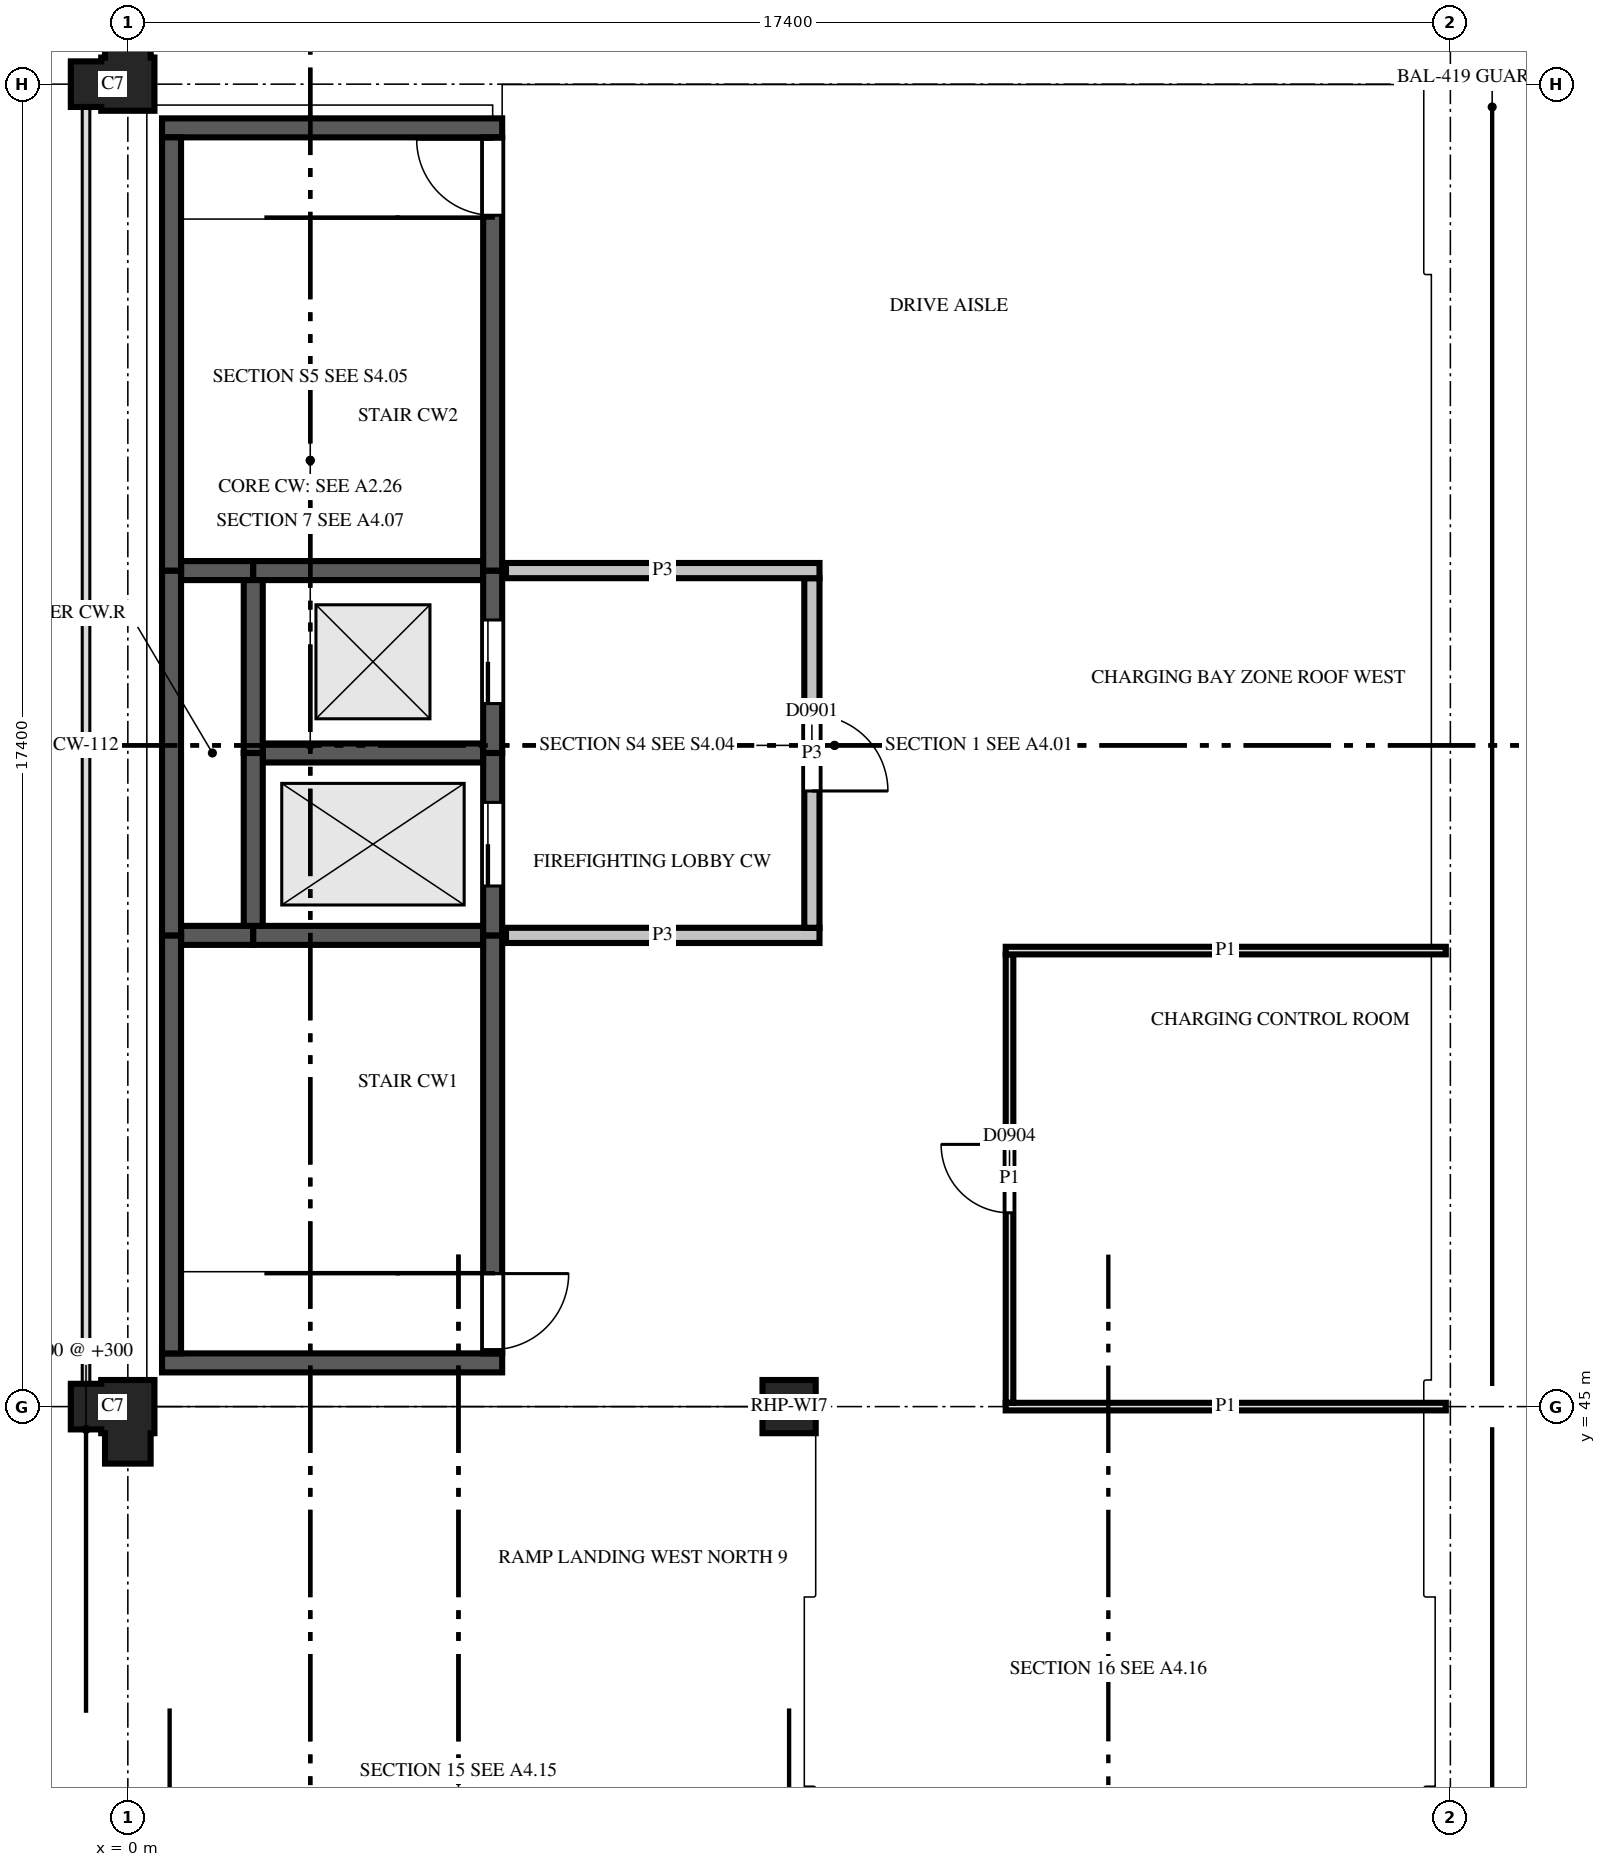
"""IFC4 building model, lengths in metres.
Left out: names, types, materials, properties, quantities, classifications, styles, units other than length and angle.
Written with IfcOpenShell. Run it as: python <this file> out.ifc"""

import sys

from ifc_helpers import new_model, si_unit, direction, frame, frame_2d, origin, origin_2d, place, context, subcontext, project, spatial, polyline, rectangle, outline, extrude, element, fill, save


model = new_model("IFC4")
c1 = context("Model", 3, precision=1e-05, world=origin(), true_north=direction((0.0, 1.0)))
c2 = subcontext(c1, "Body", "Model", "MODEL_VIEW")
j1 = project(units=[si_unit("LENGTHUNIT", "METRE"), si_unit("PLANEANGLEUNIT", "RADIAN")], contexts=[c1])
p1 = place(None, origin())
s1 = spatial("IfcSite", under=j1, at=p1, CompositionType="ELEMENT")
p2 = place(p1, origin())
s2 = spatial("IfcBuilding", under=s1, at=p2, CompositionType="ELEMENT")
p3 = place(p2, frame((0.0, 0.0, 34.1)))
s3 = spatial("IfcBuildingStorey", under=s2, at=p3, CompositionType="ELEMENT", Elevation=34.1)
for number, where, z_axis, x_axis in (
    (1, (0.0, 45.0, 0.0), (0.0, 0.0, 1.0), (-1.0, 0.0, 0.0)),
    (2, (0.0, 62.4, 0.0), (0.0, 0.0, 1.0), (0.0, 1.0, 0.0)),
):
    element("IfcColumn", number, at=place(p3, frame(where, z_axis=z_axis, x_axis=x_axis)), inside=s3, PredefinedType="COLUMN", context=c2, shape_type="SweptSolid", body=[
        extrude(outline(polyline([(-0.35, -0.35), (0.35, -0.35), (0.35, -0.3), (0.75, -0.3), (0.75, 0.3), (0.35, 0.3), (0.35, 0.35), (0.3, 0.35), (0.3, 0.75), (-0.3, 0.75), (-0.3, 0.35), (-0.35, 0.35), (-0.35, -0.35)])), origin(), (0.0, 0.0, 1.0), 3.7),
    ])
p4 = place(p3, frame((0.45, 45.575, 0.0), z_axis=(0.0, 0.0, 1.0), x_axis=(1.0, 0.0, 0.0)))
e3 = element("IfcWall", 3, at=p4, inside=s3, PredefinedType="SHEAR", context=c2, shape_type="SweptSolid", body=[
    extrude(rectangle(XDim=4.475, YDim=0.25, at=frame_2d((2.238, 0.0))), origin(), (0.0, 0.0, 1.0), 3.45),
])
p5 = place(p3, frame((0.7, 51.2, 0.0), z_axis=(0.0, 0.0, 1.0), x_axis=(1.0, 0.0, 0.0)))
e4 = element("IfcWall", 4, at=p5, inside=s3, PredefinedType="SHEAR", context=c2, shape_type="SweptSolid", body=[
    extrude(rectangle(XDim=0.95, YDim=0.25, at=frame_2d((0.475, 0.0))), origin(), (0.0, 0.0, 1.0), 3.45),
])
p6 = place(p3, frame((1.65, 51.2, 0.0), z_axis=(0.0, 0.0, 1.0), x_axis=(1.0, 0.0, 0.0)))
e5 = element("IfcWall", 5, at=p6, inside=s3, PredefinedType="SHEAR", context=c2, shape_type="SweptSolid", body=[
    extrude(rectangle(XDim=3.025, YDim=0.25, at=frame_2d((1.513, 0.0))), origin(), (0.0, 0.0, 1.0), 3.45),
])
p7 = place(p3, frame((1.775, 53.6, 0.0), z_axis=(0.0, 0.0, 1.0), x_axis=(1.0, 0.0, 0.0)))
e6 = element("IfcWall", 6, at=p7, inside=s3, PredefinedType="SHEAR", context=c2, shape_type="SweptSolid", body=[
    extrude(rectangle(XDim=2.9, YDim=0.25, at=frame_2d((1.45, 0.0))), origin(), (0.0, 0.0, 1.0), 4.95),
])
p8 = place(p3, frame((0.7, 56.0, 0.0), z_axis=(0.0, 0.0, 1.0), x_axis=(1.0, 0.0, 0.0)))
e7 = element("IfcWall", 7, at=p8, inside=s3, PredefinedType="SHEAR", context=c2, shape_type="SweptSolid", body=[
    extrude(rectangle(XDim=0.95, YDim=0.25, at=frame_2d((0.475, 0.0))), origin(), (0.0, 0.0, 1.0), 3.45),
])
p9 = place(p3, frame((1.65, 56.0, 0.0), z_axis=(0.0, 0.0, 1.0), x_axis=(1.0, 0.0, 0.0)))
e8 = element("IfcWall", 8, at=p9, inside=s3, PredefinedType="SHEAR", context=c2, shape_type="SweptSolid", body=[
    extrude(rectangle(XDim=3.025, YDim=0.25, at=frame_2d((1.513, 0.0))), origin(), (0.0, 0.0, 1.0), 3.45),
])
p10 = place(p3, frame((0.45, 61.825, 0.0), z_axis=(0.0, 0.0, 1.0), x_axis=(1.0, 0.0, 0.0)))
e9 = element("IfcWall", 9, at=p10, inside=s3, PredefinedType="SHEAR", context=c2, shape_type="SweptSolid", body=[
    extrude(rectangle(XDim=4.475, YDim=0.25, at=frame_2d((2.238, 0.0))), origin(), (0.0, 0.0, 1.0), 3.45),
])
p11 = place(p3, frame((0.575, 45.7, 0.0), z_axis=(0.0, 0.0, 1.0), x_axis=(0.0, 1.0, 0.0)))
e10 = element("IfcWall", 10, at=p11, inside=s3, PredefinedType="SHEAR", context=c2, shape_type="SweptSolid", body=[
    extrude(rectangle(XDim=5.5, YDim=0.25, at=frame_2d((2.75, 0.0))), origin(), (0.0, 0.0, 1.0), 3.45),
])
p12 = place(p3, frame((0.575, 51.2, 0.0), z_axis=(0.0, 0.0, 1.0), x_axis=(0.0, 1.0, 0.0)))
e11 = element("IfcWall", 11, at=p12, inside=s3, PredefinedType="SHEAR", context=c2, shape_type="SweptSolid", body=[
    extrude(rectangle(XDim=4.8, YDim=0.25, at=frame_2d((2.4, 0.0))), origin(), (0.0, 0.0, 1.0), 3.45),
])
p13 = place(p3, frame((0.575, 56.0, 0.0), z_axis=(0.0, 0.0, 1.0), x_axis=(0.0, 1.0, 0.0)))
e12 = element("IfcWall", 12, at=p13, inside=s3, PredefinedType="SHEAR", context=c2, shape_type="SweptSolid", body=[
    extrude(rectangle(XDim=5.7, YDim=0.25, at=frame_2d((2.85, 0.0))), origin(), (0.0, 0.0, 1.0), 3.45),
])
p14 = place(p3, frame((1.65, 51.325, 0.0), z_axis=(0.0, 0.0, 1.0), x_axis=(0.0, 1.0, 0.0)))
e13 = element("IfcWall", 13, at=p14, inside=s3, PredefinedType="SHEAR", context=c2, shape_type="SweptSolid", body=[
    extrude(rectangle(XDim=2.275, YDim=0.25, at=frame_2d((1.138, 0.0))), origin(), (0.0, 0.0, 1.0), 4.95),
])
p15 = place(p3, frame((1.65, 53.6, 0.0), z_axis=(0.0, 0.0, 1.0), x_axis=(0.0, 1.0, 0.0)))
e14 = element("IfcWall", 14, at=p15, inside=s3, PredefinedType="SHEAR", context=c2, shape_type="SweptSolid", body=[
    extrude(rectangle(XDim=2.275, YDim=0.25, at=frame_2d((1.137, 0.0))), origin(), (0.0, 0.0, 1.0), 4.95),
])
p16 = place(p3, frame((4.8, 45.7, 0.0), z_axis=(0.0, 0.0, 1.0), x_axis=(0.0, 1.0, 0.0)))
e15 = element("IfcWall", 15, at=p16, inside=s3, PredefinedType="SHEAR", context=c2, shape_type="SweptSolid", body=[
    extrude(rectangle(XDim=5.5, YDim=0.25, at=frame_2d((2.75, 0.0))), origin(), (0.0, 0.0, 1.0), 3.45),
])
p17 = place(p16, frame((0.05, 0.0, 0.0)))
e16 = element("IfcOpeningElement", 16, at=p17, cuts=e15, PredefinedType="OPENING", context=c2, shape_type="SweptSolid", body=[
    extrude(rectangle(XDim=1.0, YDim=2.1, at=frame_2d((0.5, 1.05))), frame((0.0, 0.135, 0.0), z_axis=(0.0, -1.0, 0.0), x_axis=(1.0, 0.0, 0.0)), (0.0, 0.0, 1.0), 0.27),
])
p18 = place(p3, frame((4.8, 51.2, 0.0), z_axis=(0.0, 0.0, 1.0), x_axis=(0.0, 1.0, 0.0)))
e17 = element("IfcWall", 17, at=p18, inside=s3, PredefinedType="SHEAR", context=c2, shape_type="SweptSolid", body=[
    extrude(rectangle(XDim=2.4, YDim=0.25, at=frame_2d((1.2, 0.0))), origin(), (0.0, 0.0, 1.0), 4.95),
])
p19 = place(p18, frame((0.65, 0.0, 0.0)))
e18 = element("IfcOpeningElement", 18, at=p19, cuts=e17, PredefinedType="OPENING", context=c2, shape_type="SweptSolid", body=[
    extrude(rectangle(XDim=1.1, YDim=2.1, at=frame_2d((0.55, 1.05))), frame((0.0, 0.135, 0.0), z_axis=(0.0, -1.0, 0.0), x_axis=(1.0, 0.0, 0.0)), (0.0, 0.0, 1.0), 0.27),
])
p20 = place(p3, frame((4.8, 53.6, 0.0), z_axis=(0.0, 0.0, 1.0), x_axis=(0.0, 1.0, 0.0)))
e19 = element("IfcWall", 19, at=p20, inside=s3, PredefinedType="SHEAR", context=c2, shape_type="SweptSolid", body=[
    extrude(rectangle(XDim=2.4, YDim=0.25, at=frame_2d((1.2, 0.0))), origin(), (0.0, 0.0, 1.0), 4.95),
])
p21 = place(p20, frame((0.65, 0.0, 0.0)))
e20 = element("IfcOpeningElement", 20, at=p21, cuts=e19, PredefinedType="OPENING", context=c2, shape_type="SweptSolid", body=[
    extrude(rectangle(XDim=1.1, YDim=2.1, at=frame_2d((0.55, 1.05))), frame((0.0, 0.135, 0.0), z_axis=(0.0, -1.0, 0.0), x_axis=(1.0, 0.0, 0.0)), (0.0, 0.0, 1.0), 0.27),
])
p22 = place(p3, frame((4.8, 56.0, 0.0), z_axis=(0.0, 0.0, 1.0), x_axis=(0.0, 1.0, 0.0)))
e21 = element("IfcWall", 21, at=p22, inside=s3, PredefinedType="SHEAR", context=c2, shape_type="SweptSolid", body=[
    extrude(rectangle(XDim=5.7, YDim=0.25, at=frame_2d((2.85, 0.0))), origin(), (0.0, 0.0, 1.0), 3.45),
])
p23 = place(p22, frame((4.675, 0.0, 0.0)))
e22 = element("IfcOpeningElement", 22, at=p23, cuts=e21, PredefinedType="OPENING", context=c2, shape_type="SweptSolid", body=[
    extrude(rectangle(XDim=1.0, YDim=2.1, at=frame_2d((0.5, 1.05))), frame((0.0, 0.135, 0.0), z_axis=(0.0, -1.0, 0.0), x_axis=(1.0, 0.0, 0.0)), (0.0, 0.0, 1.0), 0.27),
])
p24 = place(p3, frame((0.0, 45.0, 3.7), z_axis=(0.0, 0.0, 1.0), x_axis=(1.0, 0.0, 0.0)))
e23 = element("IfcColumn", 23, at=p24, inside=s3, PredefinedType="COLUMN", context=c2, shape_type="SweptSolid", body=[
    extrude(rectangle(XDim=0.7, YDim=0.7, at=origin_2d()), origin(), (0.0, 0.0, 1.0), 0.4),
])
p25 = place(p3, frame((8.7, 45.0, 0.0), z_axis=(0.0, 0.0, 1.0), x_axis=(1.0, 0.0, 0.0)))
e24 = element("IfcColumn", 24, at=p25, inside=s3, PredefinedType="COLUMN", context=c2, shape_type="SweptSolid", body=[
    extrude(rectangle(XDim=0.7, YDim=0.7, at=origin_2d()), origin(), (0.0, 0.0, 1.0), 3.1),
])
p26 = place(p3, frame((11.55, 45.0, 0.0), z_axis=(0.0, 0.0, 1.0), x_axis=(1.0, 0.0, 0.0)))
e25 = element("IfcWall", 25, at=p26, inside=s3, PredefinedType="PARTITIONING", context=c2, shape_type="SweptSolid", body=[
    extrude(rectangle(XDim=5.79, YDim=0.1, at=frame_2d((2.895, 0.0))), origin(), (0.0, 0.0, 1.0), 2.88),
])
p27 = place(p3, frame((11.6, 50.95, 0.0), z_axis=(0.0, 0.0, 1.0), x_axis=(0.0, -1.0, 0.0)))
e26 = element("IfcWall", 26, at=p27, inside=s3, PredefinedType="PARTITIONING", context=c2, shape_type="SweptSolid", body=[
    extrude(rectangle(XDim=5.9, YDim=0.1, at=frame_2d((2.95, 0.0))), origin(), (0.0, 0.0, 1.0), 2.88),
])
p28 = place(p27, frame((2.5, 0.0, 0.0)))
e27 = element("IfcOpeningElement", 27, at=p28, cuts=e26, PredefinedType="OPENING", context=c2, shape_type="SweptSolid", body=[
    extrude(rectangle(XDim=0.9, YDim=2.1, at=frame_2d((0.45, 1.05))), frame((0.0, 0.06, 0.0), z_axis=(0.0, -1.0, 0.0), x_axis=(1.0, 0.0, 0.0)), (0.0, 0.0, 1.0), 0.12),
])
p29 = place(p3, frame((17.34, 51.0, 0.0), z_axis=(0.0, 0.0, 1.0), x_axis=(-1.0, 0.0, 0.0)))
e28 = element("IfcWall", 28, at=p29, inside=s3, PredefinedType="PARTITIONING", context=c2, shape_type="SweptSolid", body=[
    extrude(rectangle(XDim=5.79, YDim=0.1, at=frame_2d((2.895, 0.0))), origin(), (0.0, 0.0, 1.0), 2.88),
])
p30 = place(p3, frame((4.975, 51.2, 0.0), z_axis=(0.0, 0.0, 1.0), x_axis=(1.0, 0.0, 0.0)))
e29 = element("IfcWall", 29, at=p30, inside=s3, PredefinedType="PARTITIONING", context=c2, shape_type="SweptSolid", body=[
    extrude(rectangle(XDim=4.125, YDim=0.2, at=frame_2d((2.062, 0.0))), origin(), (0.0, 0.0, 1.0), 2.88),
])
p31 = place(p3, frame((9.0, 51.3, 0.0), z_axis=(0.0, 0.0, 1.0), x_axis=(0.0, 1.0, 0.0)))
e30 = element("IfcWall", 30, at=p31, inside=s3, PredefinedType="PARTITIONING", context=c2, shape_type="SweptSolid", body=[
    extrude(rectangle(XDim=4.6, YDim=0.2, at=frame_2d((2.3, 0.0))), origin(), (0.0, 0.0, 1.0), 2.88),
])
p32 = place(p31, frame((1.8, 0.0, 0.0)))
e31 = element("IfcOpeningElement", 31, at=p32, cuts=e30, PredefinedType="OPENING", context=c2, shape_type="SweptSolid", body=[
    extrude(rectangle(XDim=1.0, YDim=2.1, at=frame_2d((0.5, 1.05))), frame((0.0, 0.11, 0.0), z_axis=(0.0, -1.0, 0.0), x_axis=(1.0, 0.0, 0.0)), (0.0, 0.0, 1.0), 0.22),
])
p33 = place(p3, frame((9.1, 56.0, 0.0), z_axis=(0.0, 0.0, 1.0), x_axis=(-1.0, 0.0, 0.0)))
e32 = element("IfcWall", 32, at=p33, inside=s3, PredefinedType="PARTITIONING", context=c2, shape_type="SweptSolid", body=[
    extrude(rectangle(XDim=4.125, YDim=0.2, at=frame_2d((2.062, 0.0))), origin(), (0.0, 0.0, 1.0), 2.88),
])
p34 = place(p32, frame((1.0, 0.0, 0.0), z_axis=(0.0, 0.0, 1.0), x_axis=(-1.0, 0.0, 0.0)))
e33 = element("IfcDoor", 33, at=p34, inside=s3, OperationType="SINGLE_SWING_LEFT", PredefinedType="DOOR", context=c2, shape_type="SweptSolid", body=[
    extrude(rectangle(XDim=1.0, YDim=2.1, at=frame_2d((0.5, 1.05))), frame((0.0, 0.025, 0.0), z_axis=(0.0, -1.0, 0.0), x_axis=(1.0, 0.0, 0.0)), (0.0, 0.0, 1.0), 0.05),
])
fill(e31, e33)
p35 = place(p28, frame((0.9, 0.0, 0.0), z_axis=(0.0, 0.0, 1.0), x_axis=(-1.0, 0.0, 0.0)))
e34 = element("IfcDoor", 34, at=p35, inside=s3, OperationType="SINGLE_SWING_LEFT", PredefinedType="DOOR", context=c2, shape_type="SweptSolid", body=[
    extrude(rectangle(XDim=0.9, YDim=2.1, at=frame_2d((0.45, 1.05))), frame((0.0, 0.025, 0.0), z_axis=(0.0, -1.0, 0.0), x_axis=(1.0, 0.0, 0.0)), (0.0, 0.0, 1.0), 0.05),
])
fill(e27, e34)
p36 = place(p19, origin())
e35 = element("IfcDoor", 35, at=p36, inside=s3, OperationType="SLIDING_TO_LEFT", PredefinedType="DOOR", context=c2, shape_type="SweptSolid", body=[
    extrude(rectangle(XDim=1.1, YDim=2.1, at=frame_2d((0.55, 1.05))), frame((0.0, 0.025, 0.0), z_axis=(0.0, -1.0, 0.0), x_axis=(1.0, 0.0, 0.0)), (0.0, 0.0, 1.0), 0.05),
])
fill(e18, e35)
p37 = place(p21, origin())
e36 = element("IfcDoor", 36, at=p37, inside=s3, OperationType="SLIDING_TO_LEFT", PredefinedType="DOOR", context=c2, shape_type="SweptSolid", body=[
    extrude(rectangle(XDim=1.1, YDim=2.1, at=frame_2d((0.55, 1.05))), frame((0.0, 0.025, 0.0), z_axis=(0.0, -1.0, 0.0), x_axis=(1.0, 0.0, 0.0)), (0.0, 0.0, 1.0), 0.05),
])
fill(e20, e36)
p38 = place(p23, origin())
e37 = element("IfcDoor", 37, at=p38, inside=s3, OperationType="SINGLE_SWING_LEFT", PredefinedType="DOOR", context=c2, shape_type="SweptSolid", body=[
    extrude(rectangle(XDim=1.0, YDim=2.1, at=frame_2d((0.5, 1.05))), frame((0.0, 0.025, 0.0), z_axis=(0.0, -1.0, 0.0), x_axis=(1.0, 0.0, 0.0)), (0.0, 0.0, 1.0), 0.05),
])
fill(e22, e37)
p39 = place(p17, origin())
e38 = element("IfcDoor", 38, at=p39, inside=s3, OperationType="SINGLE_SWING_RIGHT", PredefinedType="DOOR", context=c2, shape_type="SweptSolid", body=[
    extrude(rectangle(XDim=1.0, YDim=2.1, at=frame_2d((0.5, 1.05))), frame((0.0, 0.025, 0.0), z_axis=(0.0, -1.0, 0.0), x_axis=(1.0, 0.0, 0.0)), (0.0, 0.0, 1.0), 0.05),
])
fill(e16, e38)
save(model, sys.argv[1])
